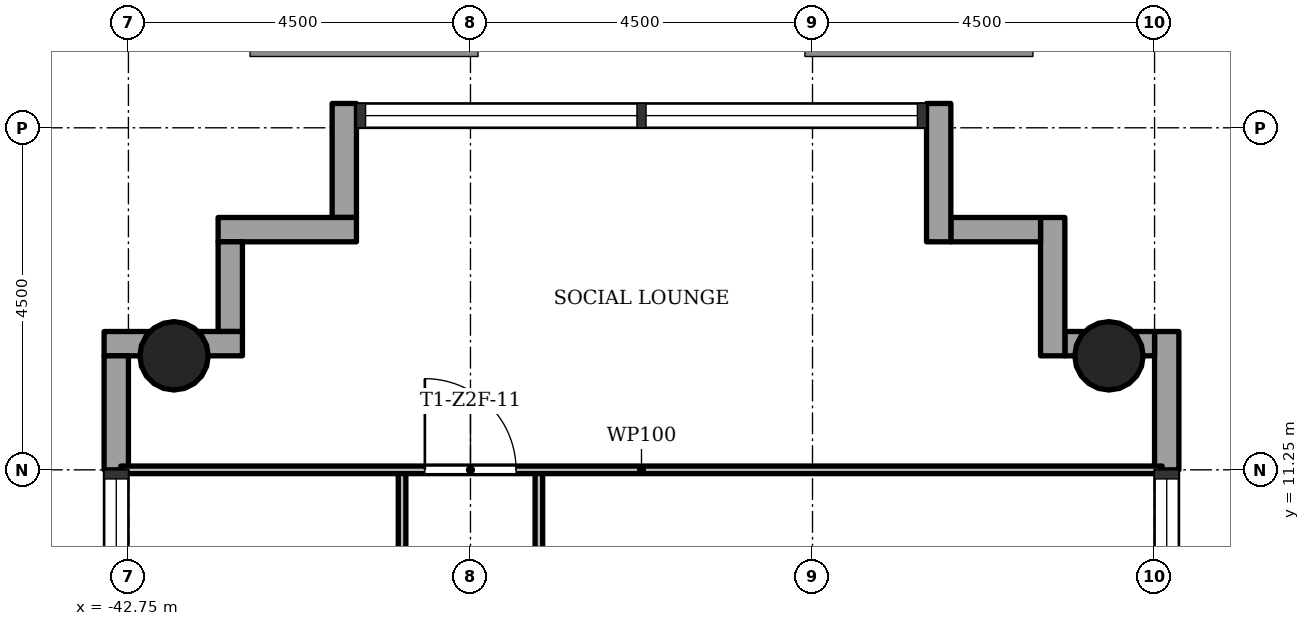
"""IFC4 building model, lengths in metres.
Left out: names, types, materials, properties, quantities, classifications, styles, units other than length and angle.
Written with IfcOpenShell. Run it as: python <this file> out.ifc"""

import sys

from ifc_helpers import new_model, si_unit, direction, frame, frame_2d, origin, origin_2d, place, context, subcontext, project, spatial, rectangle, hollow_circle, extrude, element, fill, save


model = new_model("IFC4")
c1 = context("Model", 3, precision=1e-05, world=origin(), true_north=direction((0.0, 1.0)))
c2 = subcontext(c1, "Body", "Model", "MODEL_VIEW")
j1 = project(units=[si_unit("LENGTHUNIT", "METRE"), si_unit("PLANEANGLEUNIT", "RADIAN")], contexts=[c1])
p1 = place(None, origin())
s1 = spatial("IfcSite", under=j1, at=p1, CompositionType="ELEMENT")
p2 = place(p1, origin())
s2 = spatial("IfcBuilding", under=s1, at=p2, CompositionType="ELEMENT")
p3 = place(p2, frame((0.0, 0.0, 114.0)))
s3 = spatial("IfcBuildingStorey", under=s2, at=p3, CompositionType="ELEMENT", Elevation=114.0)
for number, where, z_axis, x_axis in (
    (1, (-29.85, 12.75, 0.0), (0.0, 0.0, 1.0), (1.0, 0.0, 0.0)),
    (2, (-42.15, 12.75, 0.0), (0.0, 0.0, 1.0), (1.0, 0.0, 0.0)),
):
    element("IfcColumn", number, at=place(p3, frame(where, z_axis=z_axis, x_axis=x_axis)), inside=s3, PredefinedType="COLUMN", context=c2, shape_type="SweptSolid", body=[
        extrude(hollow_circle(Radius=0.45, WallThickness=0.032, at=origin_2d()), origin(), (0.0, 0.0, 1.0), 3.4),
    ])
p4 = place(p3, frame((-29.09, 11.25, -0.3), z_axis=(0.0, 0.0, 1.0), x_axis=(0.0, 1.0, 0.0)))
e3 = element("IfcWall", 3, at=p4, inside=s3, PredefinedType="STANDARD", context=c2, shape_type="SweptSolid", body=[
    extrude(rectangle(XDim=1.82, YDim=0.32, at=frame_2d((0.91, 0.0))), origin(), (0.0, 0.0, 1.0), 3.4),
])
p5 = place(p3, frame((-29.25, 12.91, -0.3), z_axis=(0.0, 0.0, 1.0), x_axis=(-1.0, 0.0, 0.0)))
e4 = element("IfcWall", 4, at=p5, inside=s3, PredefinedType="STANDARD", context=c2, shape_type="SweptSolid", body=[
    extrude(rectangle(XDim=1.18, YDim=0.32, at=frame_2d((0.59, 0.0))), origin(), (0.0, 0.0, 1.0), 3.4),
])
p6 = place(p3, frame((-30.59, 12.75, -0.3), z_axis=(0.0, 0.0, 1.0), x_axis=(0.0, 1.0, 0.0)))
e5 = element("IfcWall", 5, at=p6, inside=s3, PredefinedType="STANDARD", context=c2, shape_type="SweptSolid", body=[
    extrude(rectangle(XDim=1.82, YDim=0.32, at=frame_2d((0.91, 0.0))), origin(), (0.0, 0.0, 1.0), 3.4),
])
p7 = place(p3, frame((-30.75, 14.41, -0.3), z_axis=(0.0, 0.0, 1.0), x_axis=(-1.0, 0.0, 0.0)))
e6 = element("IfcWall", 6, at=p7, inside=s3, PredefinedType="STANDARD", context=c2, shape_type="SweptSolid", body=[
    extrude(rectangle(XDim=1.18, YDim=0.32, at=frame_2d((0.59, 0.0))), origin(), (0.0, 0.0, 1.0), 3.4),
])
p8 = place(p3, frame((-32.09, 14.25, -0.3), z_axis=(0.0, 0.0, 1.0), x_axis=(0.0, 1.0, 0.0)))
e7 = element("IfcWall", 7, at=p8, inside=s3, PredefinedType="STANDARD", context=c2, shape_type="SweptSolid", body=[
    extrude(rectangle(XDim=1.82, YDim=0.32, at=frame_2d((0.91, 0.0))), origin(), (0.0, 0.0, 1.0), 3.4),
])
p9 = place(p3, frame((-39.91, 16.07, -0.3), z_axis=(0.0, 0.0, 1.0), x_axis=(0.0, -1.0, 0.0)))
e8 = element("IfcWall", 8, at=p9, inside=s3, PredefinedType="STANDARD", context=c2, shape_type="SweptSolid", body=[
    extrude(rectangle(XDim=1.5, YDim=0.32, at=frame_2d((0.75, 0.0))), origin(), (0.0, 0.0, 1.0), 3.4),
])
p10 = place(p3, frame((-39.75, 14.41, -0.3), z_axis=(0.0, 0.0, 1.0), x_axis=(-1.0, 0.0, 0.0)))
e9 = element("IfcWall", 9, at=p10, inside=s3, PredefinedType="STANDARD", context=c2, shape_type="SweptSolid", body=[
    extrude(rectangle(XDim=1.82, YDim=0.32, at=frame_2d((0.91, 0.0))), origin(), (0.0, 0.0, 1.0), 3.4),
])
p11 = place(p3, frame((-41.41, 14.25, -0.3), z_axis=(0.0, 0.0, 1.0), x_axis=(0.0, -1.0, 0.0)))
e10 = element("IfcWall", 10, at=p11, inside=s3, PredefinedType="STANDARD", context=c2, shape_type="SweptSolid", body=[
    extrude(rectangle(XDim=1.18, YDim=0.32, at=frame_2d((0.59, 0.0))), origin(), (0.0, 0.0, 1.0), 3.4),
])
p12 = place(p3, frame((-41.25, 12.91, -0.3), z_axis=(0.0, 0.0, 1.0), x_axis=(-1.0, 0.0, 0.0)))
e11 = element("IfcWall", 11, at=p12, inside=s3, PredefinedType="STANDARD", context=c2, shape_type="SweptSolid", body=[
    extrude(rectangle(XDim=1.82, YDim=0.32, at=frame_2d((0.91, 0.0))), origin(), (0.0, 0.0, 1.0), 3.4),
])
p13 = place(p3, frame((-42.91, 12.75, -0.3), z_axis=(0.0, 0.0, 1.0), x_axis=(0.0, -1.0, 0.0)))
e12 = element("IfcWall", 12, at=p13, inside=s3, PredefinedType="STANDARD", context=c2, shape_type="SweptSolid", body=[
    extrude(rectangle(XDim=1.5, YDim=0.32, at=frame_2d((0.75, 0.0))), origin(), (0.0, 0.0, 1.0), 3.4),
])
p14 = place(p3, frame((-39.15, 6.75, 0.0), z_axis=(0.0, 0.0, 1.0), x_axis=(0.0, 1.0, 0.0)))
e13 = element("IfcWall", 13, at=p14, inside=s3, PredefinedType="PARTITIONING", context=c2, shape_type="SweptSolid", body=[
    extrude(rectangle(XDim=4.5, YDim=0.1, at=frame_2d((2.25, 0.0))), origin(), (0.0, 0.0, 1.0), 3.0),
])
p15 = place(p14, frame((1.8, 0.0, 0.0)))
e14 = element("IfcOpeningElement", 14, at=p15, cuts=e13, PredefinedType="OPENING", context=c2, shape_type="SweptSolid", body=[
    extrude(rectangle(XDim=0.9, YDim=2.1, at=frame_2d((0.45, 1.05))), frame((0.0, 0.06, 0.0), z_axis=(0.0, -1.0, 0.0), x_axis=(1.0, 0.0, 0.0)), (0.0, 0.0, 1.0), 0.12),
])
p16 = place(p3, frame((-37.35, 8.55, 0.0), z_axis=(0.0, 0.0, 1.0), x_axis=(0.0, 1.0, 0.0)))
e15 = element("IfcWall", 15, at=p16, inside=s3, PredefinedType="PARTITIONING", context=c2, shape_type="SweptSolid", body=[
    extrude(rectangle(XDim=2.7, YDim=0.1, at=frame_2d((1.35, 0.0))), origin(), (0.0, 0.0, 1.0), 3.0),
])
p17 = place(p16, frame((0.07, 0.0, 0.0)))
e16 = element("IfcOpeningElement", 16, at=p17, cuts=e15, PredefinedType="OPENING", context=c2, shape_type="SweptSolid", body=[
    extrude(rectangle(XDim=0.9, YDim=2.1, at=frame_2d((0.45, 1.05))), frame((0.0, 0.06, 0.0), z_axis=(0.0, -1.0, 0.0), x_axis=(1.0, 0.0, 0.0)), (0.0, 0.0, 1.0), 0.12),
])
p18 = place(p3, frame((-42.85, 11.25, 0.0), z_axis=(0.0, 0.0, 1.0), x_axis=(1.0, 0.0, 0.0)))
e17 = element("IfcWall", 17, at=p18, inside=s3, PredefinedType="PARTITIONING", context=c2, shape_type="SweptSolid", body=[
    extrude(rectangle(XDim=13.7, YDim=0.1, at=frame_2d((6.85, 0.0))), origin(), (0.0, 0.0, 1.0), 3.0),
])
p19 = place(p18, frame((4.0, 0.0, 0.0)))
e18 = element("IfcOpeningElement", 18, at=p19, cuts=e17, PredefinedType="OPENING", context=c2, shape_type="SweptSolid", body=[
    extrude(rectangle(XDim=1.2, YDim=2.1, at=frame_2d((0.6, 1.05))), frame((0.0, 0.06, 0.0), z_axis=(0.0, -1.0, 0.0), x_axis=(1.0, 0.0, 0.0)), (0.0, 0.0, 1.0), 0.12),
])
p20 = place(p19, origin())
e19 = element("IfcDoor", 19, at=p20, inside=s3, OperationType="SINGLE_SWING_RIGHT", PredefinedType="DOOR", context=c2, shape_type="SweptSolid", body=[
    extrude(rectangle(XDim=1.2, YDim=2.1, at=frame_2d((0.6, 1.05))), frame((0.0, 0.025, 0.0), z_axis=(0.0, -1.0, 0.0), x_axis=(1.0, 0.0, 0.0)), (0.0, 0.0, 1.0), 0.05),
])
fill(e18, e19)
save(model, sys.argv[1])
